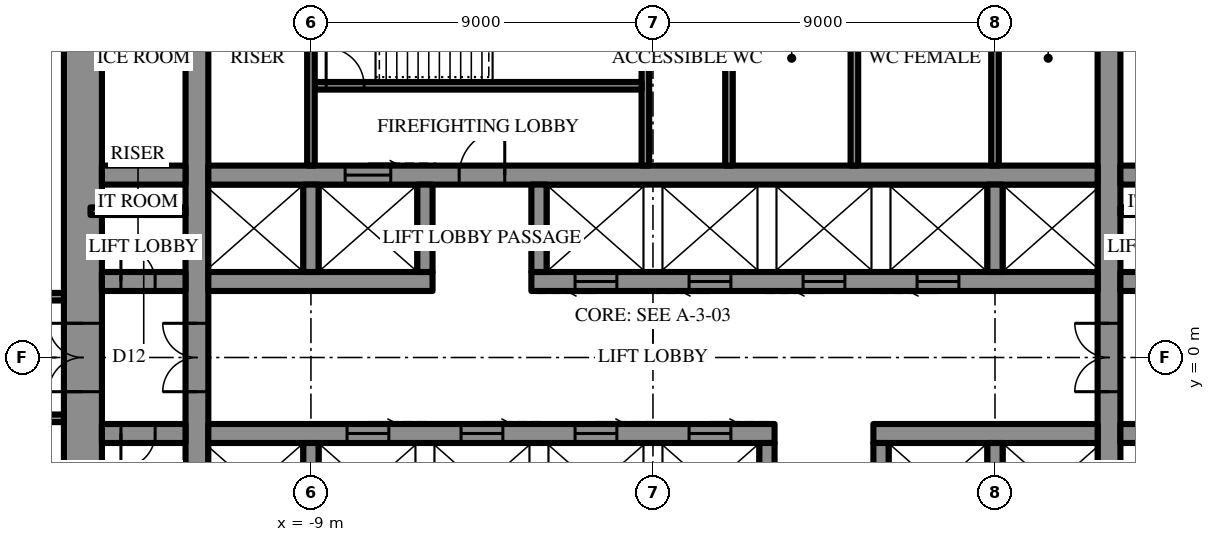
"""IFC4 building model, lengths in metres.
Left out: names, types, materials, properties, quantities, classifications, styles, units other than length and angle.
Written with IfcOpenShell. Run it as: python <this file> out.ifc"""

import sys

from ifc_helpers import new_model, si_unit, direction, frame, frame_2d, origin, place, context, subcontext, project, spatial, rectangle, extrude, element, fill, save


model = new_model("IFC4")
c1 = context("Model", 3, precision=1e-05, world=origin(), true_north=direction((0.0, 1.0)))
c2 = subcontext(c1, "Body", "Model", "MODEL_VIEW")
j1 = project(units=[si_unit("LENGTHUNIT", "METRE"), si_unit("PLANEANGLEUNIT", "RADIAN")], contexts=[c1])
p1 = place(None, origin())
s1 = spatial("IfcSite", under=j1, at=p1, CompositionType="ELEMENT")
p2 = place(p1, origin())
s2 = spatial("IfcBuilding", under=s1, at=p2, CompositionType="ELEMENT")
p3 = place(p2, frame((0.0, 0.0, 282.7)))
s3 = spatial("IfcBuildingStorey", under=s2, at=p3, CompositionType="ELEMENT", Elevation=282.7)
p4 = place(p3, frame((-15.0, 10.7, 0.0), z_axis=(0.0, 0.0, 1.0), x_axis=(0.0, -1.0, 0.0)))
e1 = element("IfcWall", 1, at=p4, inside=s3, PredefinedType="SHEAR", context=c2, shape_type="SweptSolid", body=[
    extrude(rectangle(XDim=21.4, YDim=1.0, at=frame_2d((10.7, 0.0))), origin(), (0.0, 0.0, 1.0), 4.2),
])
p5 = place(p4, frame((9.8, 0.0, 0.0)))
e2 = element("IfcOpeningElement", 2, at=p5, cuts=e1, PredefinedType="OPENING", context=c2, shape_type="SweptSolid", body=[
    extrude(rectangle(XDim=1.8, YDim=2.4, at=frame_2d((0.9, 1.2))), frame((0.0, 0.51, 0.0), z_axis=(0.0, -1.0, 0.0), x_axis=(1.0, 0.0, 0.0)), (0.0, 0.0, 1.0), 1.02),
])
p6 = place(p3, frame((12.0, -10.7, 0.0), z_axis=(0.0, 0.0, 1.0), x_axis=(0.0, 1.0, 0.0)))
e3 = element("IfcWall", 3, at=p6, inside=s3, PredefinedType="SHEAR", context=c2, shape_type="SweptSolid", body=[
    extrude(rectangle(XDim=21.4, YDim=0.6, at=frame_2d((10.7, 0.0))), origin(), (0.0, 0.0, 1.0), 4.2),
])
p7 = place(p6, frame((9.8, 0.0, 0.0)))
e4 = element("IfcOpeningElement", 4, at=p7, cuts=e3, PredefinedType="OPENING", context=c2, shape_type="SweptSolid", body=[
    extrude(rectangle(XDim=1.8, YDim=2.4, at=frame_2d((0.9, 1.2))), frame((0.0, 0.31, 0.0), z_axis=(0.0, -1.0, 0.0), x_axis=(1.0, 0.0, 0.0)), (0.0, 0.0, 1.0), 0.62),
])
p8 = place(p3, frame((-12.0, -10.7, 0.0), z_axis=(0.0, 0.0, 1.0), x_axis=(0.0, 1.0, 0.0)))
e5 = element("IfcWall", 5, at=p8, inside=s3, PredefinedType="SHEAR", context=c2, shape_type="SweptSolid", body=[
    extrude(rectangle(XDim=21.4, YDim=0.6, at=frame_2d((10.7, 0.0))), origin(), (0.0, 0.0, 1.0), 4.2),
])
p9 = place(p8, frame((9.8, 0.0, 0.0)))
e6 = element("IfcOpeningElement", 6, at=p9, cuts=e5, PredefinedType="OPENING", context=c2, shape_type="SweptSolid", body=[
    extrude(rectangle(XDim=1.8, YDim=2.4, at=frame_2d((0.9, 1.2))), frame((0.0, 0.31, 0.0), z_axis=(0.0, -1.0, 0.0), x_axis=(1.0, 0.0, 0.0)), (0.0, 0.0, 1.0), 0.62),
])
p10 = place(p3, frame((-14.5, 2.0, 0.0), z_axis=(0.0, 0.0, 1.0), x_axis=(1.0, 0.0, 0.0)))
e7 = element("IfcWall", 7, at=p10, inside=s3, PredefinedType="SHEAR", context=c2, shape_type="SweptSolid", body=[
    extrude(rectangle(XDim=2.2, YDim=0.5, at=frame_2d((1.1, 0.0))), origin(), (0.0, 0.0, 1.0), 4.2),
])
p11 = place(p10, frame((0.5, 0.0, 0.0)))
e8 = element("IfcOpeningElement", 8, at=p11, cuts=e7, PredefinedType="OPENING", context=c2, shape_type="SweptSolid", body=[
    extrude(rectangle(XDim=0.9, YDim=2.2, at=frame_2d((0.45, 1.1))), frame((0.0, 0.26, 0.0), z_axis=(0.0, -1.0, 0.0), x_axis=(1.0, 0.0, 0.0)), (0.0, 0.0, 1.0), 0.52),
])
p12 = place(p3, frame((-11.7, 2.0, 0.0), z_axis=(0.0, 0.0, 1.0), x_axis=(1.0, 0.0, 0.0)))
e9 = element("IfcWall", 9, at=p12, inside=s3, PredefinedType="SHEAR", context=c2, shape_type="SweptSolid", body=[
    extrude(rectangle(XDim=5.9, YDim=0.5, at=frame_2d((2.95, 0.0))), origin(), (0.0, 0.0, 1.0), 4.2),
])
p13 = place(p3, frame((-3.2, 2.0, 0.0), z_axis=(0.0, 0.0, 1.0), x_axis=(1.0, 0.0, 0.0)))
e10 = element("IfcWall", 10, at=p13, inside=s3, PredefinedType="SHEAR", context=c2, shape_type="SweptSolid", body=[
    extrude(rectangle(XDim=14.9, YDim=0.5, at=frame_2d((7.45, 0.0))), origin(), (0.0, 0.0, 1.0), 4.2),
])
p14 = place(p13, frame((1.15, 0.0, 0.0)))
e11 = element("IfcOpeningElement", 11, at=p14, cuts=e10, PredefinedType="OPENING", context=c2, shape_type="SweptSolid", body=[
    extrude(rectangle(XDim=1.1, YDim=2.2, at=frame_2d((0.55, 1.1))), frame((0.0, 0.26, 0.0), z_axis=(0.0, -1.0, 0.0), x_axis=(1.0, 0.0, 0.0)), (0.0, 0.0, 1.0), 0.52),
])
p15 = place(p13, frame((4.15, 0.0, 0.0)))
e12 = element("IfcOpeningElement", 12, at=p15, cuts=e10, PredefinedType="OPENING", context=c2, shape_type="SweptSolid", body=[
    extrude(rectangle(XDim=1.1, YDim=2.2, at=frame_2d((0.55, 1.1))), frame((0.0, 0.26, 0.0), z_axis=(0.0, -1.0, 0.0), x_axis=(1.0, 0.0, 0.0)), (0.0, 0.0, 1.0), 0.52),
])
p16 = place(p13, frame((7.15, 0.0, 0.0)))
e13 = element("IfcOpeningElement", 13, at=p16, cuts=e10, PredefinedType="OPENING", context=c2, shape_type="SweptSolid", body=[
    extrude(rectangle(XDim=1.1, YDim=2.2, at=frame_2d((0.55, 1.1))), frame((0.0, 0.26, 0.0), z_axis=(0.0, -1.0, 0.0), x_axis=(1.0, 0.0, 0.0)), (0.0, 0.0, 1.0), 0.52),
])
p17 = place(p13, frame((10.15, 0.0, 0.0)))
e14 = element("IfcOpeningElement", 14, at=p17, cuts=e10, PredefinedType="OPENING", context=c2, shape_type="SweptSolid", body=[
    extrude(rectangle(XDim=1.1, YDim=2.2, at=frame_2d((0.55, 1.1))), frame((0.0, 0.26, 0.0), z_axis=(0.0, -1.0, 0.0), x_axis=(1.0, 0.0, 0.0)), (0.0, 0.0, 1.0), 0.52),
])
p18 = place(p3, frame((12.3, 2.0, 0.0), z_axis=(0.0, 0.0, 1.0), x_axis=(1.0, 0.0, 0.0)))
e15 = element("IfcWall", 15, at=p18, inside=s3, PredefinedType="SHEAR", context=c2, shape_type="SweptSolid", body=[
    extrude(rectangle(XDim=2.2, YDim=0.5, at=frame_2d((1.1, 0.0))), origin(), (0.0, 0.0, 1.0), 4.2),
])
p19 = place(p18, frame((0.8, 0.0, 0.0)))
e16 = element("IfcOpeningElement", 16, at=p19, cuts=e15, PredefinedType="OPENING", context=c2, shape_type="SweptSolid", body=[
    extrude(rectangle(XDim=0.9, YDim=2.2, at=frame_2d((0.45, 1.1))), frame((0.0, 0.26, 0.0), z_axis=(0.0, -1.0, 0.0), x_axis=(1.0, 0.0, 0.0)), (0.0, 0.0, 1.0), 0.52),
])
p20 = place(p3, frame((-14.5, 4.8, 0.0), z_axis=(0.0, 0.0, 1.0), x_axis=(1.0, 0.0, 0.0)))
e17 = element("IfcWall", 17, at=p20, inside=s3, PredefinedType="SHEAR", context=c2, shape_type="SweptSolid", body=[
    extrude(rectangle(XDim=2.2, YDim=0.5, at=frame_2d((1.1, 0.0))), origin(), (0.0, 0.0, 1.0), 4.2),
])
p21 = place(p3, frame((-11.7, 4.8, 0.0), z_axis=(0.0, 0.0, 1.0), x_axis=(1.0, 0.0, 0.0)))
e18 = element("IfcWall", 18, at=p21, inside=s3, PredefinedType="SHEAR", context=c2, shape_type="SweptSolid", body=[
    extrude(rectangle(XDim=23.4, YDim=0.5, at=frame_2d((11.7, 0.0))), origin(), (0.0, 0.0, 1.0), 4.2),
])
p22 = place(p21, frame((6.6, 0.0, 0.0)))
e19 = element("IfcOpeningElement", 19, at=p22, cuts=e18, PredefinedType="OPENING", context=c2, shape_type="SweptSolid", body=[
    extrude(rectangle(XDim=1.2, YDim=2.2, at=frame_2d((0.6, 1.1))), frame((0.0, 0.26, 0.0), z_axis=(0.0, -1.0, 0.0), x_axis=(1.0, 0.0, 0.0)), (0.0, 0.0, 1.0), 0.52),
])
p23 = place(p21, frame((3.6, 0.0, 0.0)))
e20 = element("IfcOpeningElement", 20, at=p23, cuts=e18, PredefinedType="OPENING", context=c2, shape_type="SweptSolid", body=[
    extrude(rectangle(XDim=1.2, YDim=2.2, at=frame_2d((0.6, 1.1))), frame((0.0, 0.26, 0.0), z_axis=(0.0, -1.0, 0.0), x_axis=(1.0, 0.0, 0.0)), (0.0, 0.0, 1.0), 0.52),
])
p24 = place(p3, frame((12.3, 4.8, 0.0), z_axis=(0.0, 0.0, 1.0), x_axis=(1.0, 0.0, 0.0)))
e21 = element("IfcWall", 21, at=p24, inside=s3, PredefinedType="SHEAR", context=c2, shape_type="SweptSolid", body=[
    extrude(rectangle(XDim=2.2, YDim=0.5, at=frame_2d((1.1, 0.0))), origin(), (0.0, 0.0, 1.0), 4.2),
])
for number, where, z_axis, x_axis in (
    (22, (-9.0, 2.25, 0.0), (0.0, 0.0, 1.0), (0.0, 1.0, 0.0)),
    (23, (-6.0, 2.25, 0.0), (0.0, 0.0, 1.0), (0.0, 1.0, 0.0)),
    (24, (-3.0, 2.25, 0.0), (0.0, 0.0, 1.0), (0.0, 1.0, 0.0)),
    (25, (9.0, 2.25, 0.0), (0.0, 0.0, 1.0), (0.0, 1.0, 0.0)),
):
    element("IfcWall", number, at=place(p3, frame(where, z_axis=z_axis, x_axis=x_axis)), inside=s3, PredefinedType="SHEAR", context=c2, shape_type="SweptSolid", body=[
        extrude(rectangle(XDim=2.3, YDim=0.4, at=frame_2d((1.15, 0.0))), origin(), (0.0, 0.0, 1.0), 4.2),
    ])
p25 = place(p3, frame((-0.2, 5.05, 0.0), z_axis=(0.0, 0.0, 1.0), x_axis=(0.0, 1.0, 0.0)))
e26 = element("IfcWall", 26, at=p25, inside=s3, PredefinedType="SHEAR", context=c2, shape_type="SweptSolid", body=[
    extrude(rectangle(XDim=5.65, YDim=0.2, at=frame_2d((2.825, 0.0))), origin(), (0.0, 0.0, 1.0), 4.2),
])
p26 = place(p3, frame((-8.9, 7.15, 0.0), z_axis=(0.0, 0.0, 1.0), x_axis=(1.0, 0.0, 0.0)))
e27 = element("IfcWall", 27, at=p26, inside=s3, PredefinedType="SHEAR", context=c2, shape_type="SweptSolid", body=[
    extrude(rectangle(XDim=8.6, YDim=0.2, at=frame_2d((4.3, 0.0))), origin(), (0.0, 0.0, 1.0), 4.2),
])
p27 = place(p26, frame((0.3, 0.0, 0.0)))
e28 = element("IfcOpeningElement", 28, at=p27, cuts=e27, PredefinedType="OPENING", context=c2, shape_type="SweptSolid", body=[
    extrude(rectangle(XDim=1.0, YDim=2.2, at=frame_2d((0.5, 1.1))), frame((0.0, 0.11, 0.0), z_axis=(0.0, -1.0, 0.0), x_axis=(1.0, 0.0, 0.0)), (0.0, 0.0, 1.0), 0.22),
])
p28 = place(p3, frame((14.5, -2.0, 0.0), z_axis=(0.0, 0.0, 1.0), x_axis=(-1.0, 0.0, 0.0)))
e29 = element("IfcWall", 29, at=p28, inside=s3, PredefinedType="SHEAR", context=c2, shape_type="SweptSolid", body=[
    extrude(rectangle(XDim=2.2, YDim=0.5, at=frame_2d((1.1, 0.0))), origin(), (0.0, 0.0, 1.0), 4.2),
])
p29 = place(p28, frame((0.5, 0.0, 0.0)))
e30 = element("IfcOpeningElement", 30, at=p29, cuts=e29, PredefinedType="OPENING", context=c2, shape_type="SweptSolid", body=[
    extrude(rectangle(XDim=0.9, YDim=2.2, at=frame_2d((0.45, 1.1))), frame((0.0, 0.26, 0.0), z_axis=(0.0, -1.0, 0.0), x_axis=(1.0, 0.0, 0.0)), (0.0, 0.0, 1.0), 0.52),
])
p30 = place(p3, frame((11.7, -2.0, 0.0), z_axis=(0.0, 0.0, 1.0), x_axis=(-1.0, 0.0, 0.0)))
e31 = element("IfcWall", 31, at=p30, inside=s3, PredefinedType="SHEAR", context=c2, shape_type="SweptSolid", body=[
    extrude(rectangle(XDim=5.9, YDim=0.5, at=frame_2d((2.95, 0.0))), origin(), (0.0, 0.0, 1.0), 4.2),
])
p31 = place(p3, frame((3.2, -2.0, 0.0), z_axis=(0.0, 0.0, 1.0), x_axis=(-1.0, 0.0, 0.0)))
e32 = element("IfcWall", 32, at=p31, inside=s3, PredefinedType="SHEAR", context=c2, shape_type="SweptSolid", body=[
    extrude(rectangle(XDim=14.9, YDim=0.5, at=frame_2d((7.45, 0.0))), origin(), (0.0, 0.0, 1.0), 4.2),
])
p32 = place(p31, frame((1.15, 0.0, 0.0)))
e33 = element("IfcOpeningElement", 33, at=p32, cuts=e32, PredefinedType="OPENING", context=c2, shape_type="SweptSolid", body=[
    extrude(rectangle(XDim=1.1, YDim=2.2, at=frame_2d((0.55, 1.1))), frame((0.0, 0.26, 0.0), z_axis=(0.0, -1.0, 0.0), x_axis=(1.0, 0.0, 0.0)), (0.0, 0.0, 1.0), 0.52),
])
p33 = place(p31, frame((4.15, 0.0, 0.0)))
e34 = element("IfcOpeningElement", 34, at=p33, cuts=e32, PredefinedType="OPENING", context=c2, shape_type="SweptSolid", body=[
    extrude(rectangle(XDim=1.1, YDim=2.2, at=frame_2d((0.55, 1.1))), frame((0.0, 0.26, 0.0), z_axis=(0.0, -1.0, 0.0), x_axis=(1.0, 0.0, 0.0)), (0.0, 0.0, 1.0), 0.52),
])
p34 = place(p31, frame((7.15, 0.0, 0.0)))
e35 = element("IfcOpeningElement", 35, at=p34, cuts=e32, PredefinedType="OPENING", context=c2, shape_type="SweptSolid", body=[
    extrude(rectangle(XDim=1.1, YDim=2.2, at=frame_2d((0.55, 1.1))), frame((0.0, 0.26, 0.0), z_axis=(0.0, -1.0, 0.0), x_axis=(1.0, 0.0, 0.0)), (0.0, 0.0, 1.0), 0.52),
])
p35 = place(p31, frame((10.15, 0.0, 0.0)))
e36 = element("IfcOpeningElement", 36, at=p35, cuts=e32, PredefinedType="OPENING", context=c2, shape_type="SweptSolid", body=[
    extrude(rectangle(XDim=1.1, YDim=2.2, at=frame_2d((0.55, 1.1))), frame((0.0, 0.26, 0.0), z_axis=(0.0, -1.0, 0.0), x_axis=(1.0, 0.0, 0.0)), (0.0, 0.0, 1.0), 0.52),
])
p36 = place(p3, frame((-12.3, -2.0, 0.0), z_axis=(0.0, 0.0, 1.0), x_axis=(-1.0, 0.0, 0.0)))
e37 = element("IfcWall", 37, at=p36, inside=s3, PredefinedType="SHEAR", context=c2, shape_type="SweptSolid", body=[
    extrude(rectangle(XDim=2.2, YDim=0.5, at=frame_2d((1.1, 0.0))), origin(), (0.0, 0.0, 1.0), 4.2),
])
p37 = place(p36, frame((0.8, 0.0, 0.0)))
e38 = element("IfcOpeningElement", 38, at=p37, cuts=e37, PredefinedType="OPENING", context=c2, shape_type="SweptSolid", body=[
    extrude(rectangle(XDim=0.9, YDim=2.2, at=frame_2d((0.45, 1.1))), frame((0.0, 0.26, 0.0), z_axis=(0.0, -1.0, 0.0), x_axis=(1.0, 0.0, 0.0)), (0.0, 0.0, 1.0), 0.52),
])
for number, where, z_axis, x_axis in (
    (39, (9.0, -2.25, 0.0), (0.0, 0.0, 1.0), (0.0, -1.0, 0.0)),
    (40, (6.0, -2.25, 0.0), (0.0, 0.0, 1.0), (0.0, -1.0, 0.0)),
    (41, (3.0, -2.25, 0.0), (0.0, 0.0, 1.0), (0.0, -1.0, 0.0)),
    (42, (-9.0, -2.25, 0.0), (0.0, 0.0, 1.0), (0.0, -1.0, 0.0)),
):
    element("IfcWall", number, at=place(p3, frame(where, z_axis=z_axis, x_axis=x_axis)), inside=s3, PredefinedType="SHEAR", context=c2, shape_type="SweptSolid", body=[
        extrude(rectangle(XDim=2.3, YDim=0.4, at=frame_2d((1.15, 0.0))), origin(), (0.0, 0.0, 1.0), 4.2),
    ])
for number, where, z_axis, x_axis in (
    (43, (-9.0, 5.05, 0.0), (0.0, 0.0, 1.0), (0.0, 1.0, 0.0)),
    (44, (9.0, 5.05, 0.0), (0.0, 0.0, 1.0), (0.0, 1.0, 0.0)),
    (45, (2.0, 5.05, 0.0), (0.0, 0.0, 1.0), (0.0, 1.0, 0.0)),
    (46, (5.3, 5.05, 0.0), (0.0, 0.0, 1.0), (0.0, 1.0, 0.0)),
):
    element("IfcWall", number, at=place(p3, frame(where, z_axis=z_axis, x_axis=x_axis)), inside=s3, PredefinedType="PARTITIONING", context=c2, shape_type="SweptSolid", body=[
        extrude(rectangle(XDim=5.65, YDim=0.2, at=frame_2d((2.825, 0.0))), origin(), (0.0, 0.0, 1.0), 4.0),
    ])
for number, where, z_axis, x_axis in (
    (47, (-14.8, 3.85, 0.0), (0.0, 0.0, 1.0), (1.0, 0.0, 0.0)),
    (48, (12.3, 3.85, 0.0), (0.0, 0.0, 1.0), (1.0, 0.0, 0.0)),
):
    element("IfcWall", number, at=place(p3, frame(where, z_axis=z_axis, x_axis=x_axis)), inside=s3, PredefinedType="PARTITIONING", context=c2, shape_type="SweptSolid", body=[
        extrude(rectangle(XDim=2.5, YDim=0.2, at=frame_2d((1.25, 0.0))), origin(), (0.0, 0.0, 1.0), 4.0),
    ])
p38 = place(p3, frame((-15.5, 1.6, 0.0), z_axis=(0.0, 0.0, 1.0), x_axis=(-1.0, 0.0, 0.0)))
e49 = element("IfcWall", 49, at=p38, inside=s3, PredefinedType="PARTITIONING", context=c2, shape_type="SweptSolid", body=[
    extrude(rectangle(XDim=9.7, YDim=0.2, at=frame_2d((4.85, 0.0))), origin(), (0.0, 0.0, 1.0), 4.0),
])
p39 = place(p38, frame((4.35, 0.0, 0.0)))
e50 = element("IfcOpeningElement", 50, at=p39, cuts=e49, PredefinedType="OPENING", context=c2, shape_type="SweptSolid", body=[
    extrude(rectangle(XDim=1.0, YDim=2.2, at=frame_2d((0.5, 1.1))), frame((0.0, 0.11, 0.0), z_axis=(0.0, -1.0, 0.0), x_axis=(1.0, 0.0, 0.0)), (0.0, 0.0, 1.0), 0.22),
])
p40 = place(p3, frame((-15.5, -1.6, 0.0), z_axis=(0.0, 0.0, 1.0), x_axis=(-1.0, 0.0, 0.0)))
e51 = element("IfcWall", 51, at=p40, inside=s3, PredefinedType="PARTITIONING", context=c2, shape_type="SweptSolid", body=[
    extrude(rectangle(XDim=9.7, YDim=0.2, at=frame_2d((4.85, 0.0))), origin(), (0.0, 0.0, 1.0), 4.0),
])
p41 = place(p40, frame((4.35, 0.0, 0.0)))
e52 = element("IfcOpeningElement", 52, at=p41, cuts=e51, PredefinedType="OPENING", context=c2, shape_type="SweptSolid", body=[
    extrude(rectangle(XDim=1.0, YDim=2.2, at=frame_2d((0.5, 1.1))), frame((0.0, 0.11, 0.0), z_axis=(0.0, -1.0, 0.0), x_axis=(1.0, 0.0, 0.0)), (0.0, 0.0, 1.0), 0.22),
])
p42 = place(p5, frame((1.8, 0.0, 0.0), z_axis=(0.0, 0.0, 1.0), x_axis=(-1.0, 0.0, 0.0)))
e53 = element("IfcDoor", 53, at=p42, inside=s3, OperationType="DOUBLE_DOOR_SINGLE_SWING", PredefinedType="DOOR", context=c2, shape_type="SweptSolid", body=[
    extrude(rectangle(XDim=1.8, YDim=2.4, at=frame_2d((0.9, 1.2))), frame((0.0, 0.025, 0.0), z_axis=(0.0, -1.0, 0.0), x_axis=(1.0, 0.0, 0.0)), (0.0, 0.0, 1.0), 0.05),
])
fill(e2, e53)
p43 = place(p22, origin())
e54 = element("IfcDoor", 54, at=p43, inside=s3, OperationType="SINGLE_SWING_LEFT", PredefinedType="DOOR", context=c2, shape_type="SweptSolid", body=[
    extrude(rectangle(XDim=1.2, YDim=2.2, at=frame_2d((0.6, 1.1))), frame((0.0, 0.025, 0.0), z_axis=(0.0, -1.0, 0.0), x_axis=(1.0, 0.0, 0.0)), (0.0, 0.0, 1.0), 0.05),
])
fill(e19, e54)
p44 = place(p27, origin())
e55 = element("IfcDoor", 55, at=p44, inside=s3, OperationType="SINGLE_SWING_RIGHT", PredefinedType="DOOR", context=c2, shape_type="SweptSolid", body=[
    extrude(rectangle(XDim=1.0, YDim=2.2, at=frame_2d((0.5, 1.1))), frame((0.0, 0.025, 0.0), z_axis=(0.0, -1.0, 0.0), x_axis=(1.0, 0.0, 0.0)), (0.0, 0.0, 1.0), 0.05),
])
fill(e28, e55)
p45 = place(p11, origin())
e56 = element("IfcDoor", 56, at=p45, inside=s3, OperationType="SINGLE_SWING_RIGHT", PredefinedType="DOOR", context=c2, shape_type="SweptSolid", body=[
    extrude(rectangle(XDim=0.9, YDim=2.2, at=frame_2d((0.45, 1.1))), frame((0.0, 0.025, 0.0), z_axis=(0.0, -1.0, 0.0), x_axis=(1.0, 0.0, 0.0)), (0.0, 0.0, 1.0), 0.05),
])
fill(e8, e56)
p46 = place(p37, origin())
e57 = element("IfcDoor", 57, at=p46, inside=s3, OperationType="SINGLE_SWING_LEFT", PredefinedType="DOOR", context=c2, shape_type="SweptSolid", body=[
    extrude(rectangle(XDim=0.9, YDim=2.2, at=frame_2d((0.45, 1.1))), frame((0.0, 0.025, 0.0), z_axis=(0.0, -1.0, 0.0), x_axis=(1.0, 0.0, 0.0)), (0.0, 0.0, 1.0), 0.05),
])
fill(e38, e57)
p47 = place(p7, origin())
e58 = element("IfcDoor", 58, at=p47, inside=s3, OperationType="DOUBLE_DOOR_SINGLE_SWING", PredefinedType="DOOR", context=c2, shape_type="SweptSolid", body=[
    extrude(rectangle(XDim=1.8, YDim=2.4, at=frame_2d((0.9, 1.2))), frame((0.0, 0.025, 0.0), z_axis=(0.0, -1.0, 0.0), x_axis=(1.0, 0.0, 0.0)), (0.0, 0.0, 1.0), 0.05),
])
fill(e4, e58)
p48 = place(p9, origin())
e59 = element("IfcDoor", 59, at=p48, inside=s3, OperationType="DOUBLE_DOOR_SINGLE_SWING", PredefinedType="DOOR", context=c2, shape_type="SweptSolid", body=[
    extrude(rectangle(XDim=1.8, YDim=2.4, at=frame_2d((0.9, 1.2))), frame((0.0, 0.025, 0.0), z_axis=(0.0, -1.0, 0.0), x_axis=(1.0, 0.0, 0.0)), (0.0, 0.0, 1.0), 0.05),
])
fill(e6, e59)
p49 = place(p23, origin())
e60 = element("IfcDoor", 60, at=p49, inside=s3, OperationType="SLIDING_TO_LEFT", PredefinedType="DOOR", context=c2, shape_type="SweptSolid", body=[
    extrude(rectangle(XDim=1.2, YDim=2.2, at=frame_2d((0.6, 1.1))), frame((0.0, 0.025, 0.0), z_axis=(0.0, -1.0, 0.0), x_axis=(1.0, 0.0, 0.0)), (0.0, 0.0, 1.0), 0.05),
])
fill(e20, e60)
p50 = place(p14, frame((1.1, 0.0, 0.0), z_axis=(0.0, 0.0, 1.0), x_axis=(-1.0, 0.0, 0.0)))
e61 = element("IfcDoor", 61, at=p50, inside=s3, OperationType="SLIDING_TO_LEFT", PredefinedType="DOOR", context=c2, shape_type="SweptSolid", body=[
    extrude(rectangle(XDim=1.1, YDim=2.2, at=frame_2d((0.55, 1.1))), frame((0.0, 0.025, 0.0), z_axis=(0.0, -1.0, 0.0), x_axis=(1.0, 0.0, 0.0)), (0.0, 0.0, 1.0), 0.05),
])
fill(e11, e61)
p51 = place(p15, frame((1.1, 0.0, 0.0), z_axis=(0.0, 0.0, 1.0), x_axis=(-1.0, 0.0, 0.0)))
e62 = element("IfcDoor", 62, at=p51, inside=s3, OperationType="SLIDING_TO_LEFT", PredefinedType="DOOR", context=c2, shape_type="SweptSolid", body=[
    extrude(rectangle(XDim=1.1, YDim=2.2, at=frame_2d((0.55, 1.1))), frame((0.0, 0.025, 0.0), z_axis=(0.0, -1.0, 0.0), x_axis=(1.0, 0.0, 0.0)), (0.0, 0.0, 1.0), 0.05),
])
fill(e12, e62)
p52 = place(p16, frame((1.1, 0.0, 0.0), z_axis=(0.0, 0.0, 1.0), x_axis=(-1.0, 0.0, 0.0)))
e63 = element("IfcDoor", 63, at=p52, inside=s3, OperationType="SLIDING_TO_LEFT", PredefinedType="DOOR", context=c2, shape_type="SweptSolid", body=[
    extrude(rectangle(XDim=1.1, YDim=2.2, at=frame_2d((0.55, 1.1))), frame((0.0, 0.025, 0.0), z_axis=(0.0, -1.0, 0.0), x_axis=(1.0, 0.0, 0.0)), (0.0, 0.0, 1.0), 0.05),
])
fill(e13, e63)
p53 = place(p17, frame((1.1, 0.0, 0.0), z_axis=(0.0, 0.0, 1.0), x_axis=(-1.0, 0.0, 0.0)))
e64 = element("IfcDoor", 64, at=p53, inside=s3, OperationType="SLIDING_TO_LEFT", PredefinedType="DOOR", context=c2, shape_type="SweptSolid", body=[
    extrude(rectangle(XDim=1.1, YDim=2.2, at=frame_2d((0.55, 1.1))), frame((0.0, 0.025, 0.0), z_axis=(0.0, -1.0, 0.0), x_axis=(1.0, 0.0, 0.0)), (0.0, 0.0, 1.0), 0.05),
])
fill(e14, e64)
p54 = place(p32, frame((1.1, 0.0, 0.0), z_axis=(0.0, 0.0, 1.0), x_axis=(-1.0, 0.0, 0.0)))
e65 = element("IfcDoor", 65, at=p54, inside=s3, OperationType="SLIDING_TO_LEFT", PredefinedType="DOOR", context=c2, shape_type="SweptSolid", body=[
    extrude(rectangle(XDim=1.1, YDim=2.2, at=frame_2d((0.55, 1.1))), frame((0.0, 0.025, 0.0), z_axis=(0.0, -1.0, 0.0), x_axis=(1.0, 0.0, 0.0)), (0.0, 0.0, 1.0), 0.05),
])
fill(e33, e65)
p55 = place(p33, frame((1.1, 0.0, 0.0), z_axis=(0.0, 0.0, 1.0), x_axis=(-1.0, 0.0, 0.0)))
e66 = element("IfcDoor", 66, at=p55, inside=s3, OperationType="SLIDING_TO_LEFT", PredefinedType="DOOR", context=c2, shape_type="SweptSolid", body=[
    extrude(rectangle(XDim=1.1, YDim=2.2, at=frame_2d((0.55, 1.1))), frame((0.0, 0.025, 0.0), z_axis=(0.0, -1.0, 0.0), x_axis=(1.0, 0.0, 0.0)), (0.0, 0.0, 1.0), 0.05),
])
fill(e34, e66)
p56 = place(p34, frame((1.1, 0.0, 0.0), z_axis=(0.0, 0.0, 1.0), x_axis=(-1.0, 0.0, 0.0)))
e67 = element("IfcDoor", 67, at=p56, inside=s3, OperationType="SLIDING_TO_LEFT", PredefinedType="DOOR", context=c2, shape_type="SweptSolid", body=[
    extrude(rectangle(XDim=1.1, YDim=2.2, at=frame_2d((0.55, 1.1))), frame((0.0, 0.025, 0.0), z_axis=(0.0, -1.0, 0.0), x_axis=(1.0, 0.0, 0.0)), (0.0, 0.0, 1.0), 0.05),
])
fill(e35, e67)
p57 = place(p35, frame((1.1, 0.0, 0.0), z_axis=(0.0, 0.0, 1.0), x_axis=(-1.0, 0.0, 0.0)))
e68 = element("IfcDoor", 68, at=p57, inside=s3, OperationType="SLIDING_TO_LEFT", PredefinedType="DOOR", context=c2, shape_type="SweptSolid", body=[
    extrude(rectangle(XDim=1.1, YDim=2.2, at=frame_2d((0.55, 1.1))), frame((0.0, 0.025, 0.0), z_axis=(0.0, -1.0, 0.0), x_axis=(1.0, 0.0, 0.0)), (0.0, 0.0, 1.0), 0.05),
])
fill(e36, e68)
save(model, sys.argv[1])
